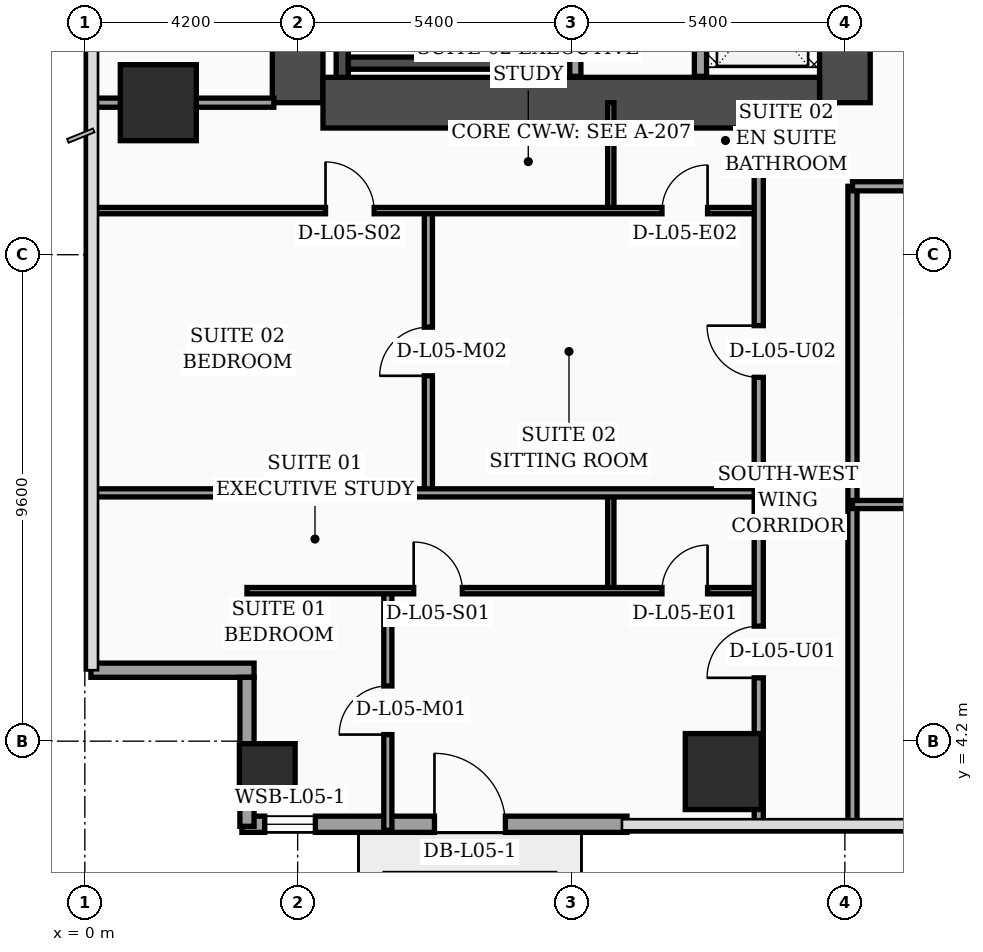
"""IFC4 building model, lengths in metres.
Left out: names, types, materials, properties, quantities, classifications, styles, units other than length and angle.
Written with IfcOpenShell. Run it as: python <this file> out.ifc"""

import sys

from ifc_helpers import new_model, si_unit, direction, frame, frame_2d, origin, origin_2d, place, context, subcontext, project, spatial, rectangle, hollow_rectangle, extrude, element, fill, save


model = new_model("IFC4")
c1 = context("Model", 3, precision=1e-05, world=origin(), true_north=direction((0.0, 1.0)))
c2 = subcontext(c1, "Body", "Model", "MODEL_VIEW")
j1 = project(units=[si_unit("LENGTHUNIT", "METRE"), si_unit("PLANEANGLEUNIT", "RADIAN")], contexts=[c1])
p1 = place(None, origin())
s1 = spatial("IfcSite", under=j1, at=p1, CompositionType="ELEMENT")
p2 = place(p1, origin())
s2 = spatial("IfcBuilding", under=s1, at=p2, CompositionType="ELEMENT")
p3 = place(p2, frame((0.0, 0.0, 27.0)))
s3 = spatial("IfcBuildingStorey", under=s2, at=p3, CompositionType="ELEMENT", Elevation=27.0)
p4 = place(p3, frame((4.2, 16.8, 0.0), z_axis=(0.0, 0.0, 1.0), x_axis=(0.0, 1.0, 0.0)))
e1 = element("IfcWall", 1, at=p4, inside=s3, PredefinedType="SHEAR", context=c2, shape_type="SweptSolid", body=[
    extrude(rectangle(XDim=21.6, YDim=1.0, at=frame_2d((10.8, 0.0))), origin(), (0.0, 0.0, 1.0), 3.56),
])
p5 = place(p3, frame((15.0, 16.8, 0.0), z_axis=(0.0, 0.0, 1.0), x_axis=(0.0, 1.0, 0.0)))
e2 = element("IfcWall", 2, at=p5, inside=s3, PredefinedType="SHEAR", context=c2, shape_type="SweptSolid", body=[
    extrude(rectangle(XDim=21.6, YDim=1.0, at=frame_2d((10.8, 0.0))), origin(), (0.0, 0.0, 1.0), 3.56),
])
p6 = place(p5, frame((8.65, 0.0, 0.0)))
e3 = element("IfcOpeningElement", 3, at=p6, cuts=e2, PredefinedType="OPENING", context=c2, shape_type="SweptSolid", body=[
    extrude(rectangle(XDim=1.1, YDim=2.2, at=frame_2d((0.55, 1.1))), frame((0.0, 0.51, 0.0), z_axis=(0.0, -1.0, 0.0), x_axis=(1.0, 0.0, 0.0)), (0.0, 0.0, 1.0), 1.02),
])
p7 = place(p5, frame((1.25, 0.0, 0.0)))
e4 = element("IfcOpeningElement", 4, at=p7, cuts=e2, PredefinedType="OPENING", context=c2, shape_type="SweptSolid", body=[
    extrude(rectangle(XDim=1.1, YDim=2.2, at=frame_2d((0.55, 1.1))), frame((0.0, 0.51, 0.0), z_axis=(0.0, -1.0, 0.0), x_axis=(1.0, 0.0, 0.0)), (0.0, 0.0, 1.0), 1.02),
])
p8 = place(p5, frame((3.8, 0.0, 0.0)))
e5 = element("IfcOpeningElement", 5, at=p8, cuts=e2, PredefinedType="OPENING", context=c2, shape_type="SweptSolid", body=[
    extrude(rectangle(XDim=1.1, YDim=2.2, at=frame_2d((0.55, 1.1))), frame((0.0, 0.51, 0.0), z_axis=(0.0, -1.0, 0.0), x_axis=(1.0, 0.0, 0.0)), (0.0, 0.0, 1.0), 1.02),
])
p9 = place(p5, frame((6.35, 0.0, 0.0)))
e6 = element("IfcOpeningElement", 6, at=p9, cuts=e2, PredefinedType="OPENING", context=c2, shape_type="SweptSolid", body=[
    extrude(rectangle(XDim=1.1, YDim=2.2, at=frame_2d((0.55, 1.1))), frame((0.0, 0.51, 0.0), z_axis=(0.0, -1.0, 0.0), x_axis=(1.0, 0.0, 0.0)), (0.0, 0.0, 1.0), 1.02),
])
p10 = place(p3, frame((4.7, 16.8, 0.0), z_axis=(0.0, 0.0, 1.0), x_axis=(1.0, 0.0, 0.0)))
e7 = element("IfcWall", 7, at=p10, inside=s3, PredefinedType="SHEAR", context=c2, shape_type="SweptSolid", body=[
    extrude(rectangle(XDim=9.8, YDim=1.0, at=frame_2d((4.9, 0.0))), origin(), (0.0, 0.0, 1.0), 3.56),
])
p11 = place(p3, frame((5.08, 17.3, 0.0), z_axis=(0.0, 0.0, 1.0), x_axis=(0.0, 1.0, 0.0)))
e8 = element("IfcWall", 8, at=p11, inside=s3, PredefinedType="SOLIDWALL", context=c2, shape_type="SweptSolid", body=[
    extrude(rectangle(XDim=9.49, YDim=0.24, at=frame_2d((4.745, 0.0))), origin(), (0.0, 0.0, 1.0), 3.56),
])
p12 = place(p3, frame((8.42, 17.3, 0.0), z_axis=(0.0, 0.0, 1.0), x_axis=(0.0, 1.0, 0.0)))
e9 = element("IfcWall", 9, at=p12, inside=s3, PredefinedType="SOLIDWALL", context=c2, shape_type="SweptSolid", body=[
    extrude(rectangle(XDim=9.49, YDim=0.24, at=frame_2d((4.745, 0.0))), origin(), (0.0, 0.0, 1.0), 3.56),
])
p13 = place(p12, frame((0.35, 0.0, 0.0)))
e10 = element("IfcOpeningElement", 10, at=p13, cuts=e9, PredefinedType="OPENING", context=c2, shape_type="SweptSolid", body=[
    extrude(rectangle(XDim=1.15, YDim=2.2, at=frame_2d((0.575, 1.1))), frame((0.0, 0.13, 0.0), z_axis=(0.0, -1.0, 0.0), x_axis=(1.0, 0.0, 0.0)), (0.0, 0.0, 1.0), 0.26),
])
p14 = place(p3, frame((5.2, 17.58, 0.0), z_axis=(0.0, 0.0, 1.0), x_axis=(1.0, 0.0, 0.0)))
e11 = element("IfcWall", 11, at=p14, inside=s3, PredefinedType="SOLIDWALL", context=c2, shape_type="SweptSolid", body=[
    extrude(rectangle(XDim=3.1, YDim=0.24, at=frame_2d((1.55, 0.0))), origin(), (0.0, 0.0, 1.0), 3.56),
])
p15 = place(p3, frame((3.6, 3.6, 0.0), z_axis=(0.0, 0.0, 1.0), x_axis=(1.0, 0.0, 0.0)))
e12 = element("IfcColumn", 12, at=p15, inside=s3, PredefinedType="COLUMN", context=c2, shape_type="SweptSolid", body=[
    extrude(hollow_rectangle(XDim=1.1, YDim=1.1, WallThickness=0.045, at=origin_2d()), origin(), (0.0, 0.0, 1.0), 3.56),
])
for number, where, z_axis, x_axis in (
    (13, (1.45, 16.8, 0.0), (0.0, 0.0, 1.0), (1.0, 0.0, 0.0)),
    (14, (12.6, 3.6, 0.0), (0.0, 0.0, 1.0), (1.0, 0.0, 0.0)),
):
    element("IfcColumn", number, at=place(p3, frame(where, z_axis=z_axis, x_axis=x_axis)), inside=s3, PredefinedType="COLUMN", context=c2, shape_type="SweptSolid", body=[
        extrude(rectangle(XDim=1.5, YDim=1.5, at=origin_2d()), origin(), (0.0, 0.0, 1.0), 3.56),
    ])
p16 = place(p3, frame((3.1, 2.56, 0.0), z_axis=(0.0, 0.0, 1.0), x_axis=(1.0, 0.0, 0.0)))
e15 = element("IfcWall", 15, at=p16, inside=s3, PredefinedType="SOLIDWALL", context=c2, shape_type="SweptSolid", body=[
    extrude(rectangle(XDim=7.6, YDim=0.32, at=frame_2d((3.8, 0.0))), origin(), (0.0, 0.0, 1.0), 3.56),
])
p17 = place(p16, frame((0.45, 0.0, 0.75)))
e16 = element("IfcOpeningElement", 16, at=p17, cuts=e15, PredefinedType="OPENING", context=c2, shape_type="SweptSolid", body=[
    extrude(rectangle(XDim=1.0, YDim=1.6, at=frame_2d((0.5, 0.8))), frame((0.0, 0.17, 0.0), z_axis=(0.0, -1.0, 0.0), x_axis=(1.0, 0.0, 0.0)), (0.0, 0.0, 1.0), 0.34),
])
p18 = place(p16, frame((3.8, 0.0, 0.0)))
e17 = element("IfcOpeningElement", 17, at=p18, cuts=e15, PredefinedType="OPENING", context=c2, shape_type="SweptSolid", body=[
    extrude(rectangle(XDim=1.4, YDim=2.25, at=frame_2d((0.7, 1.125))), frame((0.0, 0.17, 0.0), z_axis=(0.0, -1.0, 0.0), x_axis=(1.0, 0.0, 0.0)), (0.0, 0.0, 1.0), 0.34),
])
p19 = place(p3, frame((0.12, 5.6, 0.0), z_axis=(0.0, 0.0, 1.0), x_axis=(1.0, 0.0, 0.0)))
e18 = element("IfcWall", 18, at=p19, inside=s3, PredefinedType="SOLIDWALL", context=c2, shape_type="SweptSolid", body=[
    extrude(rectangle(XDim=3.22, YDim=0.28, at=frame_2d((1.61, 0.0))), origin(), (0.0, 0.0, 1.0), 2.84),
])
p20 = place(p3, frame((3.2, 5.46, 0.0), z_axis=(0.0, 0.0, 1.0), x_axis=(0.0, -1.0, 0.0)))
e19 = element("IfcWall", 19, at=p20, inside=s3, PredefinedType="SOLIDWALL", context=c2, shape_type="SweptSolid", body=[
    extrude(rectangle(XDim=2.94, YDim=0.28, at=frame_2d((1.47, 0.0))), origin(), (0.0, 0.0, 1.0), 2.84),
])
p21 = place(p3, frame((9.68, 17.32, 0.0), z_axis=(0.0, 0.0, 1.0), x_axis=(0.0, 1.0, 0.0)))
e20 = element("IfcWall", 20, at=p21, inside=s3, PredefinedType="SOLIDWALL", context=c2, shape_type="SweptSolid", body=[
    extrude(rectangle(XDim=7.68, YDim=0.22, at=frame_2d((3.84, 0.0))), origin(), (0.0, 0.0, 1.0), 3.56),
])
p22 = place(p3, frame((12.15, 17.32, 0.0), z_axis=(0.0, 0.0, 1.0), x_axis=(0.0, 1.0, 0.0)))
e21 = element("IfcWall", 21, at=p22, inside=s3, PredefinedType="SOLIDWALL", context=c2, shape_type="SweptSolid", body=[
    extrude(rectangle(XDim=7.65, YDim=0.24, at=frame_2d((3.825, 0.0))), origin(), (0.0, 0.0, 1.0), 3.56),
])
p23 = place(p3, frame((0.08, 16.8, 0.0), z_axis=(0.0, 0.0, 1.0), x_axis=(1.0, 0.0, 0.0)))
e22 = element("IfcWall", 22, at=p23, inside=s3, PredefinedType="PARTITIONING", context=c2, shape_type="SweptSolid", body=[
    extrude(rectangle(XDim=3.65, YDim=0.18, at=frame_2d((1.825, 0.0))), origin(), (0.0, 0.0, 1.0), 2.84),
])
p24 = place(p3, frame((10.38, 7.17, 0.0), z_axis=(0.0, 0.0, 1.0), x_axis=(0.0, 1.0, 0.0)))
e23 = element("IfcWall", 23, at=p24, inside=s3, PredefinedType="PARTITIONING", context=c2, shape_type="SweptSolid", body=[
    extrude(rectangle(XDim=1.93, YDim=0.125, at=frame_2d((0.965, 0.0))), origin(), (0.0, 0.0, 1.0), 3.56),
])
p25 = place(p3, frame((5.98, 2.44, 0.0), z_axis=(0.0, 0.0, 1.0), x_axis=(0.0, 1.0, 0.0)))
e24 = element("IfcWall", 24, at=p25, inside=s3, PredefinedType="PARTITIONING", context=c2, shape_type="SweptSolid", body=[
    extrude(rectangle(XDim=4.73, YDim=0.16, at=frame_2d((2.365, 0.0))), origin(), (0.0, 0.0, 1.0), 3.04),
])
p26 = place(p25, frame((1.89, 0.0, 0.0)))
e25 = element("IfcOpeningElement", 25, at=p26, cuts=e24, PredefinedType="OPENING", context=c2, shape_type="SweptSolid", body=[
    extrude(rectangle(XDim=0.96, YDim=2.2, at=frame_2d((0.48, 1.1))), frame((0.0, 0.09, 0.0), z_axis=(0.0, -1.0, 0.0), x_axis=(1.0, 0.0, 0.0)), (0.0, 0.0, 1.0), 0.18),
])
p27 = place(p3, frame((3.2, 7.17, 0.0), z_axis=(0.0, 0.0, 1.0), x_axis=(1.0, 0.0, 0.0)))
e26 = element("IfcWall", 26, at=p27, inside=s3, PredefinedType="PARTITIONING", context=c2, shape_type="SweptSolid", body=[
    extrude(rectangle(XDim=10.1, YDim=0.125, at=frame_2d((5.05, 0.0))), origin(), (0.0, 0.0, 1.0), 2.84),
])
p28 = place(p27, frame((3.29, 0.0, 0.0)))
e27 = element("IfcOpeningElement", 27, at=p28, cuts=e26, PredefinedType="OPENING", context=c2, shape_type="SweptSolid", body=[
    extrude(rectangle(XDim=0.96, YDim=2.2, at=frame_2d((0.48, 1.1))), frame((0.0, 0.073, 0.0), z_axis=(0.0, -1.0, 0.0), x_axis=(1.0, 0.0, 0.0)), (0.0, 0.0, 1.0), 0.145),
])
p29 = place(p27, frame((8.19, 0.0, 0.0)))
e28 = element("IfcOpeningElement", 28, at=p29, cuts=e26, PredefinedType="OPENING", context=c2, shape_type="SweptSolid", body=[
    extrude(rectangle(XDim=0.9, YDim=2.15, at=frame_2d((0.45, 1.075))), frame((0.0, 0.073, 0.0), z_axis=(0.0, -1.0, 0.0), x_axis=(1.0, 0.0, 0.0)), (0.0, 0.0, 1.0), 0.145),
])
p30 = place(p3, frame((10.38, 14.67, 0.0), z_axis=(0.0, 0.0, 1.0), x_axis=(0.0, 1.0, 0.0)))
e29 = element("IfcWall", 29, at=p30, inside=s3, PredefinedType="PARTITIONING", context=c2, shape_type="SweptSolid", body=[
    extrude(rectangle(XDim=2.13, YDim=0.125, at=frame_2d((1.065, 0.0))), origin(), (0.0, 0.0, 1.0), 3.56),
])
p31 = place(p3, frame((6.78, 9.1, 0.0), z_axis=(0.0, 0.0, 1.0), x_axis=(0.0, 1.0, 0.0)))
e30 = element("IfcWall", 30, at=p31, inside=s3, PredefinedType="PARTITIONING", context=c2, shape_type="SweptSolid", body=[
    extrude(rectangle(XDim=5.57, YDim=0.16, at=frame_2d((2.785, 0.0))), origin(), (0.0, 0.0, 1.0), 3.14),
])
p32 = place(p31, frame((2.31, 0.0, 0.0)))
e31 = element("IfcOpeningElement", 31, at=p32, cuts=e30, PredefinedType="OPENING", context=c2, shape_type="SweptSolid", body=[
    extrude(rectangle(XDim=0.96, YDim=2.2, at=frame_2d((0.48, 1.1))), frame((0.0, 0.09, 0.0), z_axis=(0.0, -1.0, 0.0), x_axis=(1.0, 0.0, 0.0)), (0.0, 0.0, 1.0), 0.18),
])
p33 = place(p3, frame((0.08, 14.67, 0.0), z_axis=(0.0, 0.0, 1.0), x_axis=(1.0, 0.0, 0.0)))
e32 = element("IfcWall", 32, at=p33, inside=s3, PredefinedType="PARTITIONING", context=c2, shape_type="SweptSolid", body=[
    extrude(rectangle(XDim=13.22, YDim=0.125, at=frame_2d((6.61, 0.0))), origin(), (0.0, 0.0, 1.0), 2.84),
])
p34 = place(p33, frame((4.67, 0.0, 0.0)))
e33 = element("IfcOpeningElement", 33, at=p34, cuts=e32, PredefinedType="OPENING", context=c2, shape_type="SweptSolid", body=[
    extrude(rectangle(XDim=0.96, YDim=2.2, at=frame_2d((0.48, 1.1))), frame((0.0, 0.073, 0.0), z_axis=(0.0, -1.0, 0.0), x_axis=(1.0, 0.0, 0.0)), (0.0, 0.0, 1.0), 0.145),
])
p35 = place(p33, frame((11.31, 0.0, 0.0)))
e34 = element("IfcOpeningElement", 34, at=p35, cuts=e32, PredefinedType="OPENING", context=c2, shape_type="SweptSolid", body=[
    extrude(rectangle(XDim=0.9, YDim=2.15, at=frame_2d((0.45, 1.075))), frame((0.0, 0.073, 0.0), z_axis=(0.0, -1.0, 0.0), x_axis=(1.0, 0.0, 0.0)), (0.0, 0.0, 1.0), 0.145),
])
p36 = place(p3, frame((0.08, 9.1, 0.0), z_axis=(0.0, 0.0, 1.0), x_axis=(1.0, 0.0, 0.0)))
e35 = element("IfcWall", 35, at=p36, inside=s3, PredefinedType="PARTITIONING", context=c2, shape_type="SweptSolid", body=[
    extrude(rectangle(XDim=13.22, YDim=0.16, at=frame_2d((6.61, 0.0))), origin(), (0.0, 0.0, 1.0), 2.84),
])
p37 = place(p3, frame((13.3, 2.44, 0.0), z_axis=(0.0, 0.0, 1.0), x_axis=(0.0, 1.0, 0.0)))
e36 = element("IfcWall", 36, at=p37, inside=s3, PredefinedType="PARTITIONING", context=c2, shape_type="SweptSolid", body=[
    extrude(rectangle(XDim=14.36, YDim=0.18, at=frame_2d((7.18, 0.0))), origin(), (0.0, 0.0, 1.0), 3.04),
])
p38 = place(p37, frame((3.01, 0.0, 0.0)))
e37 = element("IfcOpeningElement", 37, at=p38, cuts=e36, PredefinedType="OPENING", context=c2, shape_type="SweptSolid", body=[
    extrude(rectangle(XDim=1.02, YDim=2.2, at=frame_2d((0.51, 1.1))), frame((0.0, 0.1, 0.0), z_axis=(0.0, -1.0, 0.0), x_axis=(1.0, 0.0, 0.0)), (0.0, 0.0, 1.0), 0.2),
])
p39 = place(p37, frame((8.94, 0.0, 0.0)))
e38 = element("IfcOpeningElement", 38, at=p39, cuts=e36, PredefinedType="OPENING", context=c2, shape_type="SweptSolid", body=[
    extrude(rectangle(XDim=1.02, YDim=2.2, at=frame_2d((0.51, 1.1))), frame((0.0, 0.1, 0.0), z_axis=(0.0, -1.0, 0.0), x_axis=(1.0, 0.0, 0.0)), (0.0, 0.0, 1.0), 0.2),
])
p40 = place(p3, frame((15.15, 2.44, 0.0), z_axis=(0.0, 0.0, 1.0), x_axis=(0.0, 1.0, 0.0)))
e39 = element("IfcWall", 39, at=p40, inside=s3, PredefinedType="PARTITIONING", context=c2, shape_type="SweptSolid", body=[
    extrude(rectangle(XDim=12.71, YDim=0.18, at=frame_2d((6.355, 0.0))), origin(), (0.0, 0.0, 1.0), 3.04),
])
p41 = place(p3, frame((15.15, 8.87, 0.0), z_axis=(0.0, 0.0, 1.0), x_axis=(1.0, 0.0, 0.0)))
e40 = element("IfcWall", 40, at=p41, inside=s3, PredefinedType="PARTITIONING", context=c2, shape_type="SweptSolid", body=[
    extrude(rectangle(XDim=4.45, YDim=0.16, at=frame_2d((2.225, 0.0))), origin(), (0.0, 0.0, 1.0), 3.56),
])
p42 = place(p41, frame((1.75, 0.0, 0.0)))
e41 = element("IfcOpeningElement", 41, at=p42, cuts=e40, PredefinedType="OPENING", context=c2, shape_type="SweptSolid", body=[
    extrude(rectangle(XDim=0.96, YDim=2.2, at=frame_2d((0.48, 1.1))), frame((0.0, 0.09, 0.0), z_axis=(0.0, -1.0, 0.0), x_axis=(1.0, 0.0, 0.0)), (0.0, 0.0, 1.0), 0.18),
])
p43 = place(p3, frame((15.15, 15.15, 0.0), z_axis=(0.0, 0.0, 1.0), x_axis=(1.0, 0.0, 0.0)))
e42 = element("IfcWall", 42, at=p43, inside=s3, PredefinedType="PARTITIONING", context=c2, shape_type="SweptSolid", body=[
    extrude(rectangle(XDim=6.45, YDim=0.18, at=frame_2d((3.225, 0.0))), origin(), (0.0, 0.0, 1.0), 2.34),
])
p44 = place(p43, frame((1.74, 0.0, 0.0)))
e43 = element("IfcOpeningElement", 43, at=p44, cuts=e42, PredefinedType="OPENING", context=c2, shape_type="SweptSolid", body=[
    extrude(rectangle(XDim=1.02, YDim=2.2, at=frame_2d((0.51, 1.1))), frame((0.0, 0.1, 0.0), z_axis=(0.0, -1.0, 0.0), x_axis=(1.0, 0.0, 0.0)), (0.0, 0.0, 1.0), 0.2),
])
p45 = place(p17, origin())
e44 = element("IfcWindow", 44, at=p45, inside=s3, PartitioningType="SINGLE_PANEL", PredefinedType="WINDOW", context=c2, shape_type="SweptSolid", body=[
    extrude(rectangle(XDim=1.0, YDim=1.6, at=frame_2d((0.5, 0.8))), frame((0.0, 0.03, 0.0), z_axis=(0.0, -1.0, 0.0), x_axis=(1.0, 0.0, 0.0)), (0.0, 0.0, 1.0), 0.06),
])
fill(e16, e44)
p46 = place(p18, origin())
e45 = element("IfcDoor", 45, at=p46, inside=s3, OperationType="SINGLE_SWING_LEFT", PredefinedType="DOOR", context=c2, shape_type="SweptSolid", body=[
    extrude(rectangle(XDim=1.4, YDim=2.25, at=frame_2d((0.7, 1.125))), frame((0.0, 0.025, 0.0), z_axis=(0.0, -1.0, 0.0), x_axis=(1.0, 0.0, 0.0)), (0.0, 0.0, 1.0), 0.05),
])
fill(e17, e45)
p47 = place(p26, origin())
e46 = element("IfcDoor", 46, at=p47, inside=s3, OperationType="SINGLE_SWING_LEFT", PredefinedType="DOOR", context=c2, shape_type="SweptSolid", body=[
    extrude(rectangle(XDim=0.96, YDim=2.2, at=frame_2d((0.48, 1.1))), frame((0.0, 0.025, 0.0), z_axis=(0.0, -1.0, 0.0), x_axis=(1.0, 0.0, 0.0)), (0.0, 0.0, 1.0), 0.05),
])
fill(e25, e46)
p48 = place(p28, origin())
e47 = element("IfcDoor", 47, at=p48, inside=s3, OperationType="SINGLE_SWING_LEFT", PredefinedType="DOOR", context=c2, shape_type="SweptSolid", body=[
    extrude(rectangle(XDim=0.96, YDim=2.2, at=frame_2d((0.48, 1.1))), frame((0.0, 0.025, 0.0), z_axis=(0.0, -1.0, 0.0), x_axis=(1.0, 0.0, 0.0)), (0.0, 0.0, 1.0), 0.05),
])
fill(e27, e47)
p49 = place(p29, origin())
e48 = element("IfcDoor", 48, at=p49, inside=s3, OperationType="SINGLE_SWING_RIGHT", PredefinedType="DOOR", context=c2, shape_type="SweptSolid", body=[
    extrude(rectangle(XDim=0.9, YDim=2.15, at=frame_2d((0.45, 1.075))), frame((0.0, 0.025, 0.0), z_axis=(0.0, -1.0, 0.0), x_axis=(1.0, 0.0, 0.0)), (0.0, 0.0, 1.0), 0.05),
])
fill(e28, e48)
p50 = place(p32, origin())
e49 = element("IfcDoor", 49, at=p50, inside=s3, OperationType="SINGLE_SWING_LEFT", PredefinedType="DOOR", context=c2, shape_type="SweptSolid", body=[
    extrude(rectangle(XDim=0.96, YDim=2.2, at=frame_2d((0.48, 1.1))), frame((0.0, 0.025, 0.0), z_axis=(0.0, -1.0, 0.0), x_axis=(1.0, 0.0, 0.0)), (0.0, 0.0, 1.0), 0.05),
])
fill(e31, e49)
p51 = place(p34, origin())
e50 = element("IfcDoor", 50, at=p51, inside=s3, OperationType="SINGLE_SWING_LEFT", PredefinedType="DOOR", context=c2, shape_type="SweptSolid", body=[
    extrude(rectangle(XDim=0.96, YDim=2.2, at=frame_2d((0.48, 1.1))), frame((0.0, 0.025, 0.0), z_axis=(0.0, -1.0, 0.0), x_axis=(1.0, 0.0, 0.0)), (0.0, 0.0, 1.0), 0.05),
])
fill(e33, e50)
p52 = place(p35, origin())
e51 = element("IfcDoor", 51, at=p52, inside=s3, OperationType="SINGLE_SWING_RIGHT", PredefinedType="DOOR", context=c2, shape_type="SweptSolid", body=[
    extrude(rectangle(XDim=0.9, YDim=2.15, at=frame_2d((0.45, 1.075))), frame((0.0, 0.025, 0.0), z_axis=(0.0, -1.0, 0.0), x_axis=(1.0, 0.0, 0.0)), (0.0, 0.0, 1.0), 0.05),
])
fill(e34, e51)
p53 = place(p38, origin())
e52 = element("IfcDoor", 52, at=p53, inside=s3, OperationType="SINGLE_SWING_LEFT", PredefinedType="DOOR", context=c2, shape_type="SweptSolid", body=[
    extrude(rectangle(XDim=1.02, YDim=2.2, at=frame_2d((0.51, 1.1))), frame((0.0, 0.025, 0.0), z_axis=(0.0, -1.0, 0.0), x_axis=(1.0, 0.0, 0.0)), (0.0, 0.0, 1.0), 0.05),
])
fill(e37, e52)
p54 = place(p39, origin())
e53 = element("IfcDoor", 53, at=p54, inside=s3, OperationType="SINGLE_SWING_RIGHT", PredefinedType="DOOR", context=c2, shape_type="SweptSolid", body=[
    extrude(rectangle(XDim=1.02, YDim=2.2, at=frame_2d((0.51, 1.1))), frame((0.0, 0.025, 0.0), z_axis=(0.0, -1.0, 0.0), x_axis=(1.0, 0.0, 0.0)), (0.0, 0.0, 1.0), 0.05),
])
fill(e38, e53)
p55 = place(p13, origin())
e54 = element("IfcDoor", 54, at=p55, inside=s3, OperationType="SINGLE_SWING_LEFT", PredefinedType="DOOR", context=c2, shape_type="SweptSolid", body=[
    extrude(rectangle(XDim=1.15, YDim=2.2, at=frame_2d((0.575, 1.1))), frame((0.0, 0.025, 0.0), z_axis=(0.0, -1.0, 0.0), x_axis=(1.0, 0.0, 0.0)), (0.0, 0.0, 1.0), 0.05),
])
fill(e10, e54)
save(model, sys.argv[1])
